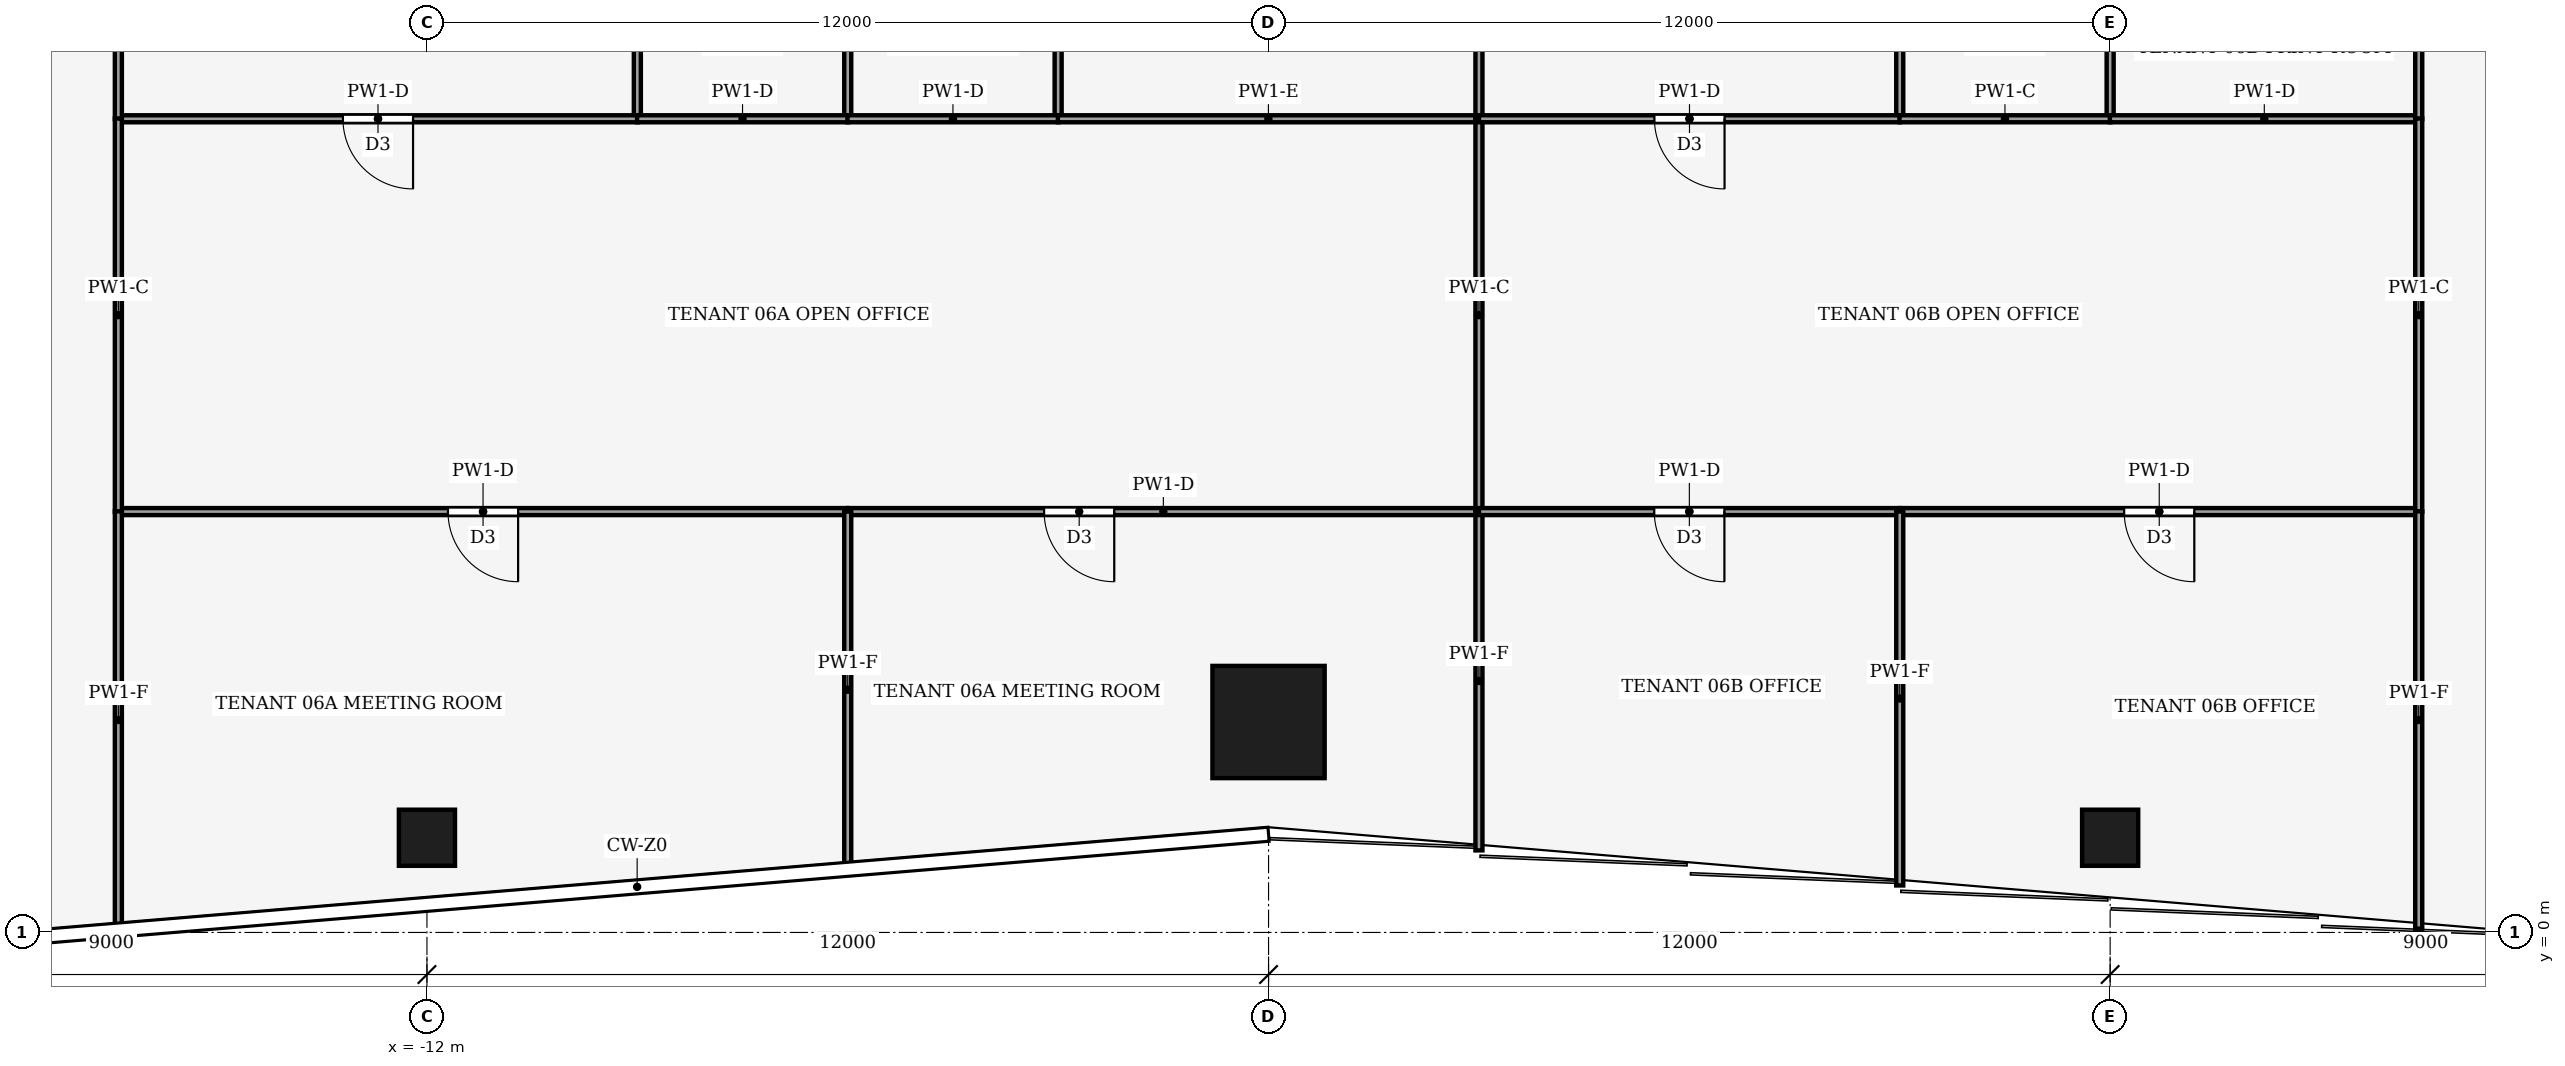
"""IFC4 building model, lengths in metres.
Left out: names, types, materials, properties, quantities, classifications, styles, units other than length and angle.
Written with IfcOpenShell. Run it as: python <this file> out.ifc"""

import sys

from ifc_helpers import new_model, si_unit, direction, frame, frame_2d, origin, origin_2d, place, context, subcontext, project, spatial, rectangle, hollow_rectangle, extrude, element, fill, save


model = new_model("IFC4")
c1 = context("Model", 3, precision=1e-05, world=origin(), true_north=direction((0.0, 1.0)))
c2 = subcontext(c1, "Body", "Model", "MODEL_VIEW")
j1 = project(units=[si_unit("LENGTHUNIT", "METRE"), si_unit("PLANEANGLEUNIT", "RADIAN")], contexts=[c1])
p1 = place(None, origin())
s1 = spatial("IfcSite", under=j1, at=p1, CompositionType="ELEMENT")
p2 = place(p1, origin())
s2 = spatial("IfcBuilding", under=s1, at=p2, CompositionType="ELEMENT")
p3 = place(p2, frame((0.0, 0.0, 30.0)))
s3 = spatial("IfcBuildingStorey", under=s2, at=p3, CompositionType="ELEMENT", Elevation=30.0)
p4 = place(p3, frame((0.0, 3.0, 0.0), z_axis=(0.0, 0.0, 1.0), x_axis=(1.0, 0.0, 0.0)))
e1 = element("IfcColumn", 1, at=p4, inside=s3, PredefinedType="COLUMN", context=c2, shape_type="SweptSolid", body=[
    extrude(hollow_rectangle(XDim=1.6, YDim=1.6, WallThickness=0.09, at=origin_2d()), origin(), (0.0, 0.0, 1.0), 4.0),
])
for number, where, z_axis, x_axis in (
    (2, (-12.0, 1.35, 0.0), (0.0, 0.0, 1.0), (1.0, 0.0, 0.0)),
    (3, (12.0, 1.35, 0.0), (0.0, 0.0, 1.0), (1.0, 0.0, 0.0)),
):
    element("IfcColumn", number, at=place(p3, frame(where, z_axis=z_axis, x_axis=x_axis)), inside=s3, PredefinedType="COLUMN", context=c2, shape_type="SweptSolid", body=[
        extrude(hollow_rectangle(XDim=0.8, YDim=0.8, WallThickness=0.04, at=origin_2d()), origin(), (0.0, 0.0, 1.0), 4.0),
    ])
p5 = place(p3, frame((-9.0, 14.6, 0.0), z_axis=(0.0, 0.0, 1.0), x_axis=(0.0, -1.0, 0.0)))
e4 = element("IfcWall", 4, at=p5, inside=s3, PredefinedType="PARTITIONING", context=c2, shape_type="SweptSolid", body=[
    extrude(rectangle(XDim=3.0, YDim=0.1, at=frame_2d((1.5, 0.0))), origin(), (0.0, 0.0, 1.0), 3.87),
])
p6 = place(p5, frame((1.0, 0.0, 0.0)))
e5 = element("IfcOpeningElement", 5, at=p6, cuts=e4, PredefinedType="OPENING", context=c2, shape_type="SweptSolid", body=[
    extrude(rectangle(XDim=1.0, YDim=2.1, at=frame_2d((0.5, 1.05))), frame((0.0, 0.06, 0.0), z_axis=(0.0, -1.0, 0.0), x_axis=(1.0, 0.0, 0.0)), (0.0, 0.0, 1.0), 0.12),
])
p7 = place(p3, frame((-8.996, 11.6, 0.0), z_axis=(0.0, 0.0, 1.0), x_axis=(-1.0, 0.0, 0.0)))
e6 = element("IfcWall", 6, at=p7, inside=s3, PredefinedType="PARTITIONING", context=c2, shape_type="SweptSolid", body=[
    extrude(rectangle(XDim=7.404, YDim=0.1, at=frame_2d((3.702, 0.0))), origin(), (0.0, 0.0, 1.0), 3.29),
])
p8 = place(p7, frame((3.202, 0.0, 0.0)))
e7 = element("IfcOpeningElement", 7, at=p8, cuts=e6, PredefinedType="OPENING", context=c2, shape_type="SweptSolid", body=[
    extrude(rectangle(XDim=1.0, YDim=2.1, at=frame_2d((0.5, 1.05))), frame((0.0, 0.06, 0.0), z_axis=(0.0, -1.0, 0.0), x_axis=(1.0, 0.0, 0.0)), (0.0, 0.0, 1.0), 0.12),
])
p9 = place(p3, frame((-16.4, 14.604, 0.0), z_axis=(0.0, 0.0, 1.0), x_axis=(0.0, -1.0, 0.0)))
e8 = element("IfcWall", 8, at=p9, inside=s3, PredefinedType="PARTITIONING", context=c2, shape_type="SweptSolid", body=[
    extrude(rectangle(XDim=3.008, YDim=0.1, at=frame_2d((1.504, 0.0))), origin(), (0.0, 0.0, 1.0), 3.87),
])
p10 = place(p3, frame((-6.0, 14.6, 0.0), z_axis=(0.0, 0.0, 1.0), x_axis=(0.0, -1.0, 0.0)))
e9 = element("IfcWall", 9, at=p10, inside=s3, PredefinedType="PARTITIONING", context=c2, shape_type="SweptSolid", body=[
    extrude(rectangle(XDim=3.0, YDim=0.1, at=frame_2d((1.5, 0.0))), origin(), (0.0, 0.0, 1.0), 3.87),
])
p11 = place(p10, frame((1.0, 0.0, 0.0)))
e10 = element("IfcOpeningElement", 10, at=p11, cuts=e9, PredefinedType="OPENING", context=c2, shape_type="SweptSolid", body=[
    extrude(rectangle(XDim=1.0, YDim=2.1, at=frame_2d((0.5, 1.05))), frame((0.0, 0.06, 0.0), z_axis=(0.0, -1.0, 0.0), x_axis=(1.0, 0.0, 0.0)), (0.0, 0.0, 1.0), 0.12),
])
p12 = place(p3, frame((-9.004, 11.6, 0.0), z_axis=(0.0, 0.0, 1.0), x_axis=(1.0, 0.0, 0.0)))
e11 = element("IfcWall", 11, at=p12, inside=s3, PredefinedType="PARTITIONING", context=c2, shape_type="SweptSolid", body=[
    extrude(rectangle(XDim=3.008, YDim=0.1, at=frame_2d((1.504, 0.0))), origin(), (0.0, 0.0, 1.0), 3.29),
])
p13 = place(p3, frame((-3.0, 11.6, 0.0), z_axis=(0.0, 0.0, 1.0), x_axis=(0.0, 1.0, 0.0)))
e12 = element("IfcWall", 12, at=p13, inside=s3, PredefinedType="PARTITIONING", context=c2, shape_type="SweptSolid", body=[
    extrude(rectangle(XDim=3.0, YDim=0.1, at=frame_2d((1.5, 0.0))), origin(), (0.0, 0.0, 1.0), 3.87),
])
p14 = place(p3, frame((-6.004, 11.6, 0.0), z_axis=(0.0, 0.0, 1.0), x_axis=(1.0, 0.0, 0.0)))
e13 = element("IfcWall", 13, at=p14, inside=s3, PredefinedType="PARTITIONING", context=c2, shape_type="SweptSolid", body=[
    extrude(rectangle(XDim=3.008, YDim=0.1, at=frame_2d((1.504, 0.0))), origin(), (0.0, 0.0, 1.0), 3.29),
])
p15 = place(p3, frame((-3.004, 11.6, 0.0), z_axis=(0.0, 0.0, 1.0), x_axis=(1.0, 0.0, 0.0)))
e14 = element("IfcWall", 14, at=p15, inside=s3, PredefinedType="PARTITIONING", context=c2, shape_type="SweptSolid", body=[
    extrude(rectangle(XDim=6.004, YDim=0.1, at=frame_2d((3.002, 0.0))), origin(), (0.0, 0.0, 1.0), 3.34),
])
p16 = place(p3, frame((3.0, 11.6, 0.0), z_axis=(0.0, 0.0, 1.0), x_axis=(0.0, 1.0, 0.0)))
e15 = element("IfcWall", 15, at=p16, inside=s3, PredefinedType="PARTITIONING", context=c2, shape_type="SweptSolid", body=[
    extrude(rectangle(XDim=3.0, YDim=0.1, at=frame_2d((1.5, 0.0))), origin(), (0.0, 0.0, 1.0), 3.87),
])
p17 = place(p3, frame((-6.0, 6.0, 0.0), z_axis=(0.0, 0.0, 1.0), x_axis=(-1.0, 0.0, 0.0)))
e16 = element("IfcWall", 16, at=p17, inside=s3, PredefinedType="PARTITIONING", context=c2, shape_type="SweptSolid", body=[
    extrude(rectangle(XDim=10.4, YDim=0.1, at=frame_2d((5.2, 0.0))), origin(), (0.0, 0.0, 1.0), 3.29),
])
p18 = place(p17, frame((4.7, 0.0, 0.0)))
e17 = element("IfcOpeningElement", 17, at=p18, cuts=e16, PredefinedType="OPENING", context=c2, shape_type="SweptSolid", body=[
    extrude(rectangle(XDim=1.0, YDim=2.1, at=frame_2d((0.5, 1.05))), frame((0.0, 0.06, 0.0), z_axis=(0.0, -1.0, 0.0), x_axis=(1.0, 0.0, 0.0)), (0.0, 0.0, 1.0), 0.12),
])
p19 = place(p3, frame((3.0, 6.0, 0.0), z_axis=(0.0, 0.0, 1.0), x_axis=(-1.0, 0.0, 0.0)))
e18 = element("IfcWall", 18, at=p19, inside=s3, PredefinedType="PARTITIONING", context=c2, shape_type="SweptSolid", body=[
    extrude(rectangle(XDim=9.0, YDim=0.1, at=frame_2d((4.5, 0.0))), origin(), (0.0, 0.0, 1.0), 3.29),
])
p20 = place(p19, frame((5.2, 0.0, 0.0)))
e19 = element("IfcOpeningElement", 19, at=p20, cuts=e18, PredefinedType="OPENING", context=c2, shape_type="SweptSolid", body=[
    extrude(rectangle(XDim=1.0, YDim=2.1, at=frame_2d((0.5, 1.05))), frame((0.0, 0.06, 0.0), z_axis=(0.0, -1.0, 0.0), x_axis=(1.0, 0.0, 0.0)), (0.0, 0.0, 1.0), 0.12),
])
p21 = place(p3, frame((3.0, 6.0, 0.0), z_axis=(0.0, 0.0, 1.0), x_axis=(0.0, 1.0, 0.0)))
e20 = element("IfcWall", 20, at=p21, inside=s3, PredefinedType="PARTITIONING", context=c2, shape_type="SweptSolid", body=[
    extrude(rectangle(XDim=5.6, YDim=0.1, at=frame_2d((2.8, 0.0))), origin(), (0.0, 0.0, 1.0), 3.87),
])
p22 = place(p3, frame((-16.4, 11.604, 0.0), z_axis=(0.0, 0.0, 1.0), x_axis=(0.0, -1.0, 0.0)))
e21 = element("IfcWall", 21, at=p22, inside=s3, PredefinedType="PARTITIONING", context=c2, shape_type="SweptSolid", body=[
    extrude(rectangle(XDim=5.608, YDim=0.1, at=frame_2d((2.804, 0.0))), origin(), (0.0, 0.0, 1.0), 3.87),
])
p23 = place(p3, frame((-6.0, 0.92, 0.0), z_axis=(0.0, 0.0, 1.0), x_axis=(0.0, 1.0, 0.0)))
e22 = element("IfcWall", 22, at=p23, inside=s3, PredefinedType="PARTITIONING", context=c2, shape_type="SweptSolid", body=[
    extrude(rectangle(XDim=5.08, YDim=0.1, at=frame_2d((2.54, 0.0))), origin(), (0.0, 0.0, 1.0), 3.04),
])
p24 = place(p3, frame((-16.4, 6.004, 0.0), z_axis=(0.0, 0.0, 1.0), x_axis=(0.0, -1.0, 0.0)))
e23 = element("IfcWall", 23, at=p24, inside=s3, PredefinedType="PARTITIONING", context=c2, shape_type="SweptSolid", body=[
    extrude(rectangle(XDim=5.951, YDim=0.1, at=frame_2d((2.975, 0.0))), origin(), (0.0, 0.0, 1.0), 3.04),
])
p25 = place(p3, frame((3.0, 1.17, 0.0), z_axis=(0.0, 0.0, 1.0), x_axis=(0.0, 1.0, 0.0)))
e24 = element("IfcWall", 24, at=p25, inside=s3, PredefinedType="PARTITIONING", context=c2, shape_type="SweptSolid", body=[
    extrude(rectangle(XDim=4.83, YDim=0.1, at=frame_2d((2.415, 0.0))), origin(), (0.0, 0.0, 1.0), 3.04),
])
p26 = place(p3, frame((9.0, 14.6, 0.0), z_axis=(0.0, 0.0, 1.0), x_axis=(0.0, -1.0, 0.0)))
e25 = element("IfcWall", 25, at=p26, inside=s3, PredefinedType="PARTITIONING", context=c2, shape_type="SweptSolid", body=[
    extrude(rectangle(XDim=3.0, YDim=0.1, at=frame_2d((1.5, 0.0))), origin(), (0.0, 0.0, 1.0), 3.87),
])
p27 = place(p26, frame((1.0, 0.0, 0.0)))
e26 = element("IfcOpeningElement", 26, at=p27, cuts=e25, PredefinedType="OPENING", context=c2, shape_type="SweptSolid", body=[
    extrude(rectangle(XDim=1.0, YDim=2.1, at=frame_2d((0.5, 1.05))), frame((0.0, 0.06, 0.0), z_axis=(0.0, -1.0, 0.0), x_axis=(1.0, 0.0, 0.0)), (0.0, 0.0, 1.0), 0.12),
])
p28 = place(p3, frame((9.004, 11.6, 0.0), z_axis=(0.0, 0.0, 1.0), x_axis=(-1.0, 0.0, 0.0)))
e27 = element("IfcWall", 27, at=p28, inside=s3, PredefinedType="PARTITIONING", context=c2, shape_type="SweptSolid", body=[
    extrude(rectangle(XDim=6.004, YDim=0.1, at=frame_2d((3.002, 0.0))), origin(), (0.0, 0.0, 1.0), 3.29),
])
p29 = place(p28, frame((2.502, 0.0, 0.0)))
e28 = element("IfcOpeningElement", 28, at=p29, cuts=e27, PredefinedType="OPENING", context=c2, shape_type="SweptSolid", body=[
    extrude(rectangle(XDim=1.0, YDim=2.1, at=frame_2d((0.5, 1.05))), frame((0.0, 0.06, 0.0), z_axis=(0.0, -1.0, 0.0), x_axis=(1.0, 0.0, 0.0)), (0.0, 0.0, 1.0), 0.12),
])
p30 = place(p3, frame((12.0, 14.6, 0.0), z_axis=(0.0, 0.0, 1.0), x_axis=(0.0, -1.0, 0.0)))
e29 = element("IfcWall", 29, at=p30, inside=s3, PredefinedType="PARTITIONING", context=c2, shape_type="SweptSolid", body=[
    extrude(rectangle(XDim=3.0, YDim=0.1, at=frame_2d((1.5, 0.0))), origin(), (0.0, 0.0, 1.0), 3.29),
])
p31 = place(p30, frame((1.0, 0.0, 0.0)))
e30 = element("IfcOpeningElement", 30, at=p31, cuts=e29, PredefinedType="OPENING", context=c2, shape_type="SweptSolid", body=[
    extrude(rectangle(XDim=1.0, YDim=2.1, at=frame_2d((0.5, 1.05))), frame((0.0, 0.06, 0.0), z_axis=(0.0, -1.0, 0.0), x_axis=(1.0, 0.0, 0.0)), (0.0, 0.0, 1.0), 0.12),
])
p32 = place(p3, frame((8.996, 11.6, 0.0), z_axis=(0.0, 0.0, 1.0), x_axis=(1.0, 0.0, 0.0)))
e31 = element("IfcWall", 31, at=p32, inside=s3, PredefinedType="PARTITIONING", context=c2, shape_type="SweptSolid", body=[
    extrude(rectangle(XDim=3.008, YDim=0.1, at=frame_2d((1.504, 0.0))), origin(), (0.0, 0.0, 1.0), 3.87),
])
p33 = place(p3, frame((11.996, 11.6, 0.0), z_axis=(0.0, 0.0, 1.0), x_axis=(1.0, 0.0, 0.0)))
e32 = element("IfcWall", 32, at=p33, inside=s3, PredefinedType="PARTITIONING", context=c2, shape_type="SweptSolid", body=[
    extrude(rectangle(XDim=4.404, YDim=0.1, at=frame_2d((2.202, 0.0))), origin(), (0.0, 0.0, 1.0), 3.29),
])
p34 = place(p3, frame((16.4, 11.596, 0.0), z_axis=(0.0, 0.0, 1.0), x_axis=(0.0, 1.0, 0.0)))
e33 = element("IfcWall", 33, at=p34, inside=s3, PredefinedType="PARTITIONING", context=c2, shape_type="SweptSolid", body=[
    extrude(rectangle(XDim=3.008, YDim=0.1, at=frame_2d((1.504, 0.0))), origin(), (0.0, 0.0, 1.0), 3.87),
])
p35 = place(p3, frame((9.0, 6.0, 0.0), z_axis=(0.0, 0.0, 1.0), x_axis=(-1.0, 0.0, 0.0)))
e34 = element("IfcWall", 34, at=p35, inside=s3, PredefinedType="PARTITIONING", context=c2, shape_type="SweptSolid", body=[
    extrude(rectangle(XDim=6.0, YDim=0.1, at=frame_2d((3.0, 0.0))), origin(), (0.0, 0.0, 1.0), 3.29),
])
p36 = place(p35, frame((2.5, 0.0, 0.0)))
e35 = element("IfcOpeningElement", 35, at=p36, cuts=e34, PredefinedType="OPENING", context=c2, shape_type="SweptSolid", body=[
    extrude(rectangle(XDim=1.0, YDim=2.1, at=frame_2d((0.5, 1.05))), frame((0.0, 0.06, 0.0), z_axis=(0.0, -1.0, 0.0), x_axis=(1.0, 0.0, 0.0)), (0.0, 0.0, 1.0), 0.12),
])
p37 = place(p3, frame((16.4, 6.0, 0.0), z_axis=(0.0, 0.0, 1.0), x_axis=(-1.0, 0.0, 0.0)))
e36 = element("IfcWall", 36, at=p37, inside=s3, PredefinedType="PARTITIONING", context=c2, shape_type="SweptSolid", body=[
    extrude(rectangle(XDim=7.4, YDim=0.1, at=frame_2d((3.7, 0.0))), origin(), (0.0, 0.0, 1.0), 3.29),
])
p38 = place(p37, frame((3.2, 0.0, 0.0)))
e37 = element("IfcOpeningElement", 37, at=p38, cuts=e36, PredefinedType="OPENING", context=c2, shape_type="SweptSolid", body=[
    extrude(rectangle(XDim=1.0, YDim=2.1, at=frame_2d((0.5, 1.05))), frame((0.0, 0.06, 0.0), z_axis=(0.0, -1.0, 0.0), x_axis=(1.0, 0.0, 0.0)), (0.0, 0.0, 1.0), 0.12),
])
p39 = place(p3, frame((16.4, 5.996, 0.0), z_axis=(0.0, 0.0, 1.0), x_axis=(0.0, 1.0, 0.0)))
e38 = element("IfcWall", 38, at=p39, inside=s3, PredefinedType="PARTITIONING", context=c2, shape_type="SweptSolid", body=[
    extrude(rectangle(XDim=5.608, YDim=0.1, at=frame_2d((2.804, 0.0))), origin(), (0.0, 0.0, 1.0), 3.87),
])
p40 = place(p3, frame((9.0, 0.67, 0.0), z_axis=(0.0, 0.0, 1.0), x_axis=(0.0, 1.0, 0.0)))
e39 = element("IfcWall", 39, at=p40, inside=s3, PredefinedType="PARTITIONING", context=c2, shape_type="SweptSolid", body=[
    extrude(rectangle(XDim=5.33, YDim=0.1, at=frame_2d((2.665, 0.0))), origin(), (0.0, 0.0, 1.0), 3.04),
])
p41 = place(p3, frame((16.4, 0.053, 0.0), z_axis=(0.0, 0.0, 1.0), x_axis=(0.0, 1.0, 0.0)))
e40 = element("IfcWall", 40, at=p41, inside=s3, PredefinedType="PARTITIONING", context=c2, shape_type="SweptSolid", body=[
    extrude(rectangle(XDim=5.951, YDim=0.1, at=frame_2d((2.975, 0.0))), origin(), (0.0, 0.0, 1.0), 3.04),
])
p42 = place(p8, origin())
e41 = element("IfcDoor", 41, at=p42, inside=s3, OperationType="SINGLE_SWING_LEFT", PredefinedType="DOOR", context=c2, shape_type="SweptSolid", body=[
    extrude(rectangle(XDim=1.0, YDim=2.1, at=frame_2d((0.5, 1.05))), frame((0.0, 0.025, 0.0), z_axis=(0.0, -1.0, 0.0), x_axis=(1.0, 0.0, 0.0)), (0.0, 0.0, 1.0), 0.05),
])
fill(e7, e41)
p43 = place(p18, origin())
e42 = element("IfcDoor", 42, at=p43, inside=s3, OperationType="SINGLE_SWING_LEFT", PredefinedType="DOOR", context=c2, shape_type="SweptSolid", body=[
    extrude(rectangle(XDim=1.0, YDim=2.1, at=frame_2d((0.5, 1.05))), frame((0.0, 0.025, 0.0), z_axis=(0.0, -1.0, 0.0), x_axis=(1.0, 0.0, 0.0)), (0.0, 0.0, 1.0), 0.05),
])
fill(e17, e42)
p44 = place(p20, origin())
e43 = element("IfcDoor", 43, at=p44, inside=s3, OperationType="SINGLE_SWING_RIGHT", PredefinedType="DOOR", context=c2, shape_type="SweptSolid", body=[
    extrude(rectangle(XDim=1.0, YDim=2.1, at=frame_2d((0.5, 1.05))), frame((0.0, 0.025, 0.0), z_axis=(0.0, -1.0, 0.0), x_axis=(1.0, 0.0, 0.0)), (0.0, 0.0, 1.0), 0.05),
])
fill(e19, e43)
p45 = place(p29, origin())
e44 = element("IfcDoor", 44, at=p45, inside=s3, OperationType="SINGLE_SWING_RIGHT", PredefinedType="DOOR", context=c2, shape_type="SweptSolid", body=[
    extrude(rectangle(XDim=1.0, YDim=2.1, at=frame_2d((0.5, 1.05))), frame((0.0, 0.025, 0.0), z_axis=(0.0, -1.0, 0.0), x_axis=(1.0, 0.0, 0.0)), (0.0, 0.0, 1.0), 0.05),
])
fill(e28, e44)
p46 = place(p36, origin())
e45 = element("IfcDoor", 45, at=p46, inside=s3, OperationType="SINGLE_SWING_RIGHT", PredefinedType="DOOR", context=c2, shape_type="SweptSolid", body=[
    extrude(rectangle(XDim=1.0, YDim=2.1, at=frame_2d((0.5, 1.05))), frame((0.0, 0.025, 0.0), z_axis=(0.0, -1.0, 0.0), x_axis=(1.0, 0.0, 0.0)), (0.0, 0.0, 1.0), 0.05),
])
fill(e35, e45)
p47 = place(p38, origin())
e46 = element("IfcDoor", 46, at=p47, inside=s3, OperationType="SINGLE_SWING_LEFT", PredefinedType="DOOR", context=c2, shape_type="SweptSolid", body=[
    extrude(rectangle(XDim=1.0, YDim=2.1, at=frame_2d((0.5, 1.05))), frame((0.0, 0.025, 0.0), z_axis=(0.0, -1.0, 0.0), x_axis=(1.0, 0.0, 0.0)), (0.0, 0.0, 1.0), 0.05),
])
fill(e37, e46)
save(model, sys.argv[1])
